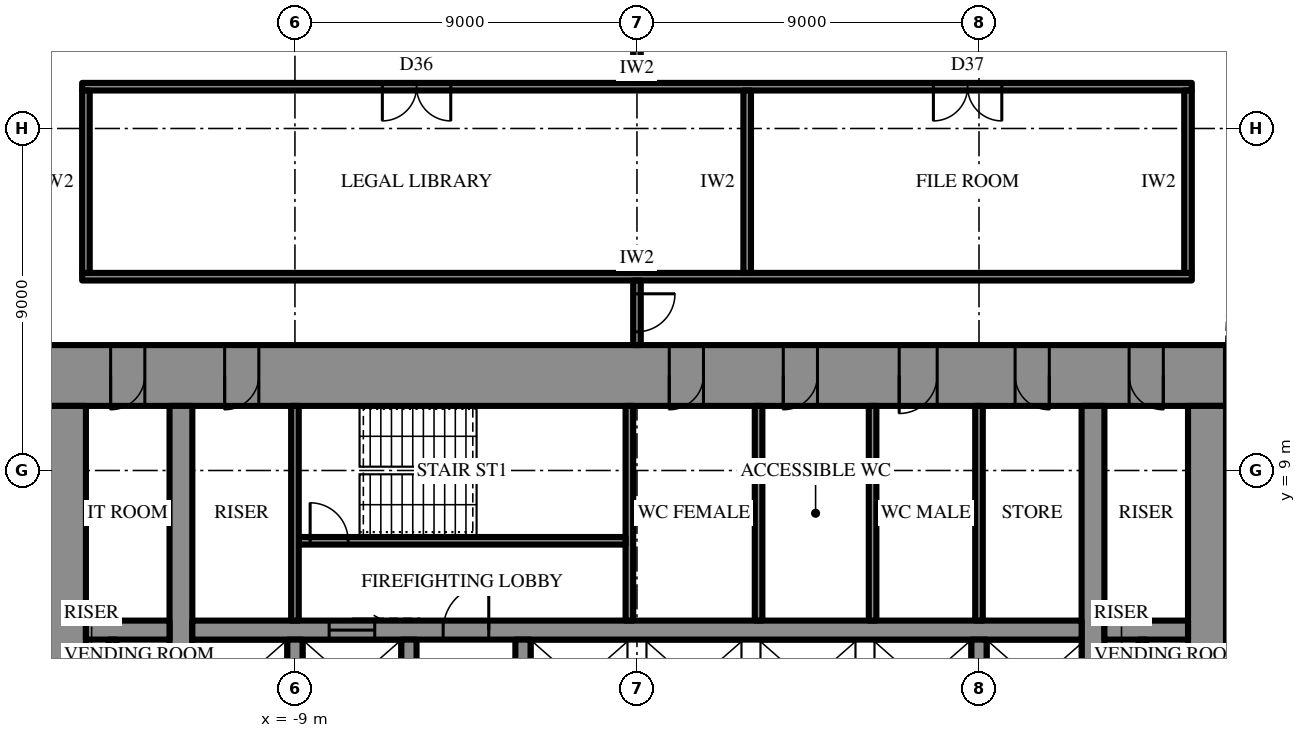
"""IFC4 building model, lengths in metres.
Left out: names, types, materials, properties, quantities, classifications, styles, units other than length and angle.
Written with IfcOpenShell. Run it as: python <this file> out.ifc"""

import sys

from ifc_helpers import new_model, si_unit, direction, frame, frame_2d, origin, place, context, subcontext, project, spatial, rectangle, extrude, element, fill, save


model = new_model("IFC4")
c1 = context("Model", 3, precision=1e-05, world=origin(), true_north=direction((0.0, 1.0)))
c2 = subcontext(c1, "Body", "Model", "MODEL_VIEW")
j1 = project(units=[si_unit("LENGTHUNIT", "METRE"), si_unit("PLANEANGLEUNIT", "RADIAN")], contexts=[c1])
p1 = place(None, origin())
s1 = spatial("IfcSite", under=j1, at=p1, CompositionType="ELEMENT")
p2 = place(p1, origin())
s2 = spatial("IfcBuilding", under=s1, at=p2, CompositionType="ELEMENT")
p3 = place(p2, frame((0.0, 0.0, 223.9)))
s3 = spatial("IfcBuildingStorey", under=s2, at=p3, CompositionType="ELEMENT", Elevation=223.9)
p4 = place(p3, frame((-15.5, 11.5, 0.0), z_axis=(0.0, 0.0, 1.0), x_axis=(1.0, 0.0, 0.0)))
e1 = element("IfcWall", 1, at=p4, inside=s3, PredefinedType="SHEAR", context=c2, shape_type="SweptSolid", body=[
    extrude(rectangle(XDim=31.0, YDim=1.6, at=frame_2d((15.5, 0.0))), origin(), (0.0, 0.0, 1.0), 4.2),
])
p5 = place(p4, frame((16.35, 0.0, 0.0)))
e2 = element("IfcOpeningElement", 2, at=p5, cuts=e1, PredefinedType="OPENING", context=c2, shape_type="SweptSolid", body=[
    extrude(rectangle(XDim=0.9, YDim=2.2, at=frame_2d((0.45, 1.1))), frame((0.0, 0.81, 0.0), z_axis=(0.0, -1.0, 0.0), x_axis=(1.0, 0.0, 0.0)), (0.0, 0.0, 1.0), 1.62),
])
p6 = place(p4, frame((19.35, 0.0, 0.0)))
e3 = element("IfcOpeningElement", 3, at=p6, cuts=e1, PredefinedType="OPENING", context=c2, shape_type="SweptSolid", body=[
    extrude(rectangle(XDim=0.9, YDim=2.2, at=frame_2d((0.45, 1.1))), frame((0.0, 0.81, 0.0), z_axis=(0.0, -1.0, 0.0), x_axis=(1.0, 0.0, 0.0)), (0.0, 0.0, 1.0), 1.62),
])
p7 = place(p4, frame((22.4, 0.0, 0.0)))
e4 = element("IfcOpeningElement", 4, at=p7, cuts=e1, PredefinedType="OPENING", context=c2, shape_type="SweptSolid", body=[
    extrude(rectangle(XDim=1.0, YDim=2.2, at=frame_2d((0.5, 1.1))), frame((0.0, 0.81, 0.0), z_axis=(0.0, -1.0, 0.0), x_axis=(1.0, 0.0, 0.0)), (0.0, 0.0, 1.0), 1.62),
])
p8 = place(p4, frame((1.65, 0.0, 0.0)))
e5 = element("IfcOpeningElement", 5, at=p8, cuts=e1, PredefinedType="OPENING", context=c2, shape_type="SweptSolid", body=[
    extrude(rectangle(XDim=0.9, YDim=2.2, at=frame_2d((0.45, 1.1))), frame((0.0, 0.81, 0.0), z_axis=(0.0, -1.0, 0.0), x_axis=(1.0, 0.0, 0.0)), (0.0, 0.0, 1.0), 1.62),
])
p9 = place(p4, frame((4.65, 0.0, 0.0)))
e6 = element("IfcOpeningElement", 6, at=p9, cuts=e1, PredefinedType="OPENING", context=c2, shape_type="SweptSolid", body=[
    extrude(rectangle(XDim=0.9, YDim=2.2, at=frame_2d((0.45, 1.1))), frame((0.0, 0.81, 0.0), z_axis=(0.0, -1.0, 0.0), x_axis=(1.0, 0.0, 0.0)), (0.0, 0.0, 1.0), 1.62),
])
p10 = place(p4, frame((25.45, 0.0, 0.0)))
e7 = element("IfcOpeningElement", 7, at=p10, cuts=e1, PredefinedType="OPENING", context=c2, shape_type="SweptSolid", body=[
    extrude(rectangle(XDim=0.9, YDim=2.2, at=frame_2d((0.45, 1.1))), frame((0.0, 0.81, 0.0), z_axis=(0.0, -1.0, 0.0), x_axis=(1.0, 0.0, 0.0)), (0.0, 0.0, 1.0), 1.62),
])
p11 = place(p4, frame((28.45, 0.0, 0.0)))
e8 = element("IfcOpeningElement", 8, at=p11, cuts=e1, PredefinedType="OPENING", context=c2, shape_type="SweptSolid", body=[
    extrude(rectangle(XDim=0.9, YDim=2.2, at=frame_2d((0.45, 1.1))), frame((0.0, 0.81, 0.0), z_axis=(0.0, -1.0, 0.0), x_axis=(1.0, 0.0, 0.0)), (0.0, 0.0, 1.0), 1.62),
])
p12 = place(p3, frame((15.0, -10.7, 0.0), z_axis=(0.0, 0.0, 1.0), x_axis=(0.0, 1.0, 0.0)))
e9 = element("IfcWall", 9, at=p12, inside=s3, PredefinedType="SHEAR", context=c2, shape_type="SweptSolid", body=[
    extrude(rectangle(XDim=21.4, YDim=1.0, at=frame_2d((10.7, 0.0))), origin(), (0.0, 0.0, 1.0), 4.2),
])
p13 = place(p12, frame((9.8, 0.0, 0.0)))
e10 = element("IfcOpeningElement", 10, at=p13, cuts=e9, PredefinedType="OPENING", context=c2, shape_type="SweptSolid", body=[
    extrude(rectangle(XDim=1.8, YDim=2.4, at=frame_2d((0.9, 1.2))), frame((0.0, 0.51, 0.0), z_axis=(0.0, -1.0, 0.0), x_axis=(1.0, 0.0, 0.0)), (0.0, 0.0, 1.0), 1.02),
])
p14 = place(p3, frame((-15.0, 10.7, 0.0), z_axis=(0.0, 0.0, 1.0), x_axis=(0.0, -1.0, 0.0)))
e11 = element("IfcWall", 11, at=p14, inside=s3, PredefinedType="SHEAR", context=c2, shape_type="SweptSolid", body=[
    extrude(rectangle(XDim=21.4, YDim=1.0, at=frame_2d((10.7, 0.0))), origin(), (0.0, 0.0, 1.0), 4.2),
])
p15 = place(p14, frame((9.8, 0.0, 0.0)))
e12 = element("IfcOpeningElement", 12, at=p15, cuts=e11, PredefinedType="OPENING", context=c2, shape_type="SweptSolid", body=[
    extrude(rectangle(XDim=1.8, YDim=2.4, at=frame_2d((0.9, 1.2))), frame((0.0, 0.51, 0.0), z_axis=(0.0, -1.0, 0.0), x_axis=(1.0, 0.0, 0.0)), (0.0, 0.0, 1.0), 1.02),
])
p16 = place(p3, frame((12.0, -10.7, 0.0), z_axis=(0.0, 0.0, 1.0), x_axis=(0.0, 1.0, 0.0)))
e13 = element("IfcWall", 13, at=p16, inside=s3, PredefinedType="SHEAR", context=c2, shape_type="SweptSolid", body=[
    extrude(rectangle(XDim=21.4, YDim=0.6, at=frame_2d((10.7, 0.0))), origin(), (0.0, 0.0, 1.0), 4.2),
])
p17 = place(p16, frame((9.8, 0.0, 0.0)))
e14 = element("IfcOpeningElement", 14, at=p17, cuts=e13, PredefinedType="OPENING", context=c2, shape_type="SweptSolid", body=[
    extrude(rectangle(XDim=1.8, YDim=2.4, at=frame_2d((0.9, 1.2))), frame((0.0, 0.31, 0.0), z_axis=(0.0, -1.0, 0.0), x_axis=(1.0, 0.0, 0.0)), (0.0, 0.0, 1.0), 0.62),
])
p18 = place(p3, frame((-12.0, -10.7, 0.0), z_axis=(0.0, 0.0, 1.0), x_axis=(0.0, 1.0, 0.0)))
e15 = element("IfcWall", 15, at=p18, inside=s3, PredefinedType="SHEAR", context=c2, shape_type="SweptSolid", body=[
    extrude(rectangle(XDim=21.4, YDim=0.6, at=frame_2d((10.7, 0.0))), origin(), (0.0, 0.0, 1.0), 4.2),
])
p19 = place(p18, frame((9.8, 0.0, 0.0)))
e16 = element("IfcOpeningElement", 16, at=p19, cuts=e15, PredefinedType="OPENING", context=c2, shape_type="SweptSolid", body=[
    extrude(rectangle(XDim=1.8, YDim=2.4, at=frame_2d((0.9, 1.2))), frame((0.0, 0.31, 0.0), z_axis=(0.0, -1.0, 0.0), x_axis=(1.0, 0.0, 0.0)), (0.0, 0.0, 1.0), 0.62),
])
p20 = place(p3, frame((-14.5, 4.8, 0.0), z_axis=(0.0, 0.0, 1.0), x_axis=(1.0, 0.0, 0.0)))
e17 = element("IfcWall", 17, at=p20, inside=s3, PredefinedType="SHEAR", context=c2, shape_type="SweptSolid", body=[
    extrude(rectangle(XDim=2.2, YDim=0.5, at=frame_2d((1.1, 0.0))), origin(), (0.0, 0.0, 1.0), 4.2),
])
p21 = place(p3, frame((-11.7, 4.8, 0.0), z_axis=(0.0, 0.0, 1.0), x_axis=(1.0, 0.0, 0.0)))
e18 = element("IfcWall", 18, at=p21, inside=s3, PredefinedType="SHEAR", context=c2, shape_type="SweptSolid", body=[
    extrude(rectangle(XDim=23.4, YDim=0.5, at=frame_2d((11.7, 0.0))), origin(), (0.0, 0.0, 1.0), 4.2),
])
p22 = place(p21, frame((6.6, 0.0, 0.0)))
e19 = element("IfcOpeningElement", 19, at=p22, cuts=e18, PredefinedType="OPENING", context=c2, shape_type="SweptSolid", body=[
    extrude(rectangle(XDim=1.2, YDim=2.2, at=frame_2d((0.6, 1.1))), frame((0.0, 0.26, 0.0), z_axis=(0.0, -1.0, 0.0), x_axis=(1.0, 0.0, 0.0)), (0.0, 0.0, 1.0), 0.52),
])
p23 = place(p21, frame((3.6, 0.0, 0.0)))
e20 = element("IfcOpeningElement", 20, at=p23, cuts=e18, PredefinedType="OPENING", context=c2, shape_type="SweptSolid", body=[
    extrude(rectangle(XDim=1.2, YDim=2.2, at=frame_2d((0.6, 1.1))), frame((0.0, 0.26, 0.0), z_axis=(0.0, -1.0, 0.0), x_axis=(1.0, 0.0, 0.0)), (0.0, 0.0, 1.0), 0.52),
])
p24 = place(p3, frame((12.3, 4.8, 0.0), z_axis=(0.0, 0.0, 1.0), x_axis=(1.0, 0.0, 0.0)))
e21 = element("IfcWall", 21, at=p24, inside=s3, PredefinedType="SHEAR", context=c2, shape_type="SweptSolid", body=[
    extrude(rectangle(XDim=2.2, YDim=0.5, at=frame_2d((1.1, 0.0))), origin(), (0.0, 0.0, 1.0), 4.2),
])
for number, where, z_axis, x_axis in (
    (22, (-9.0, 2.25, 0.0), (0.0, 0.0, 1.0), (0.0, 1.0, 0.0)),
    (23, (-6.0, 2.25, 0.0), (0.0, 0.0, 1.0), (0.0, 1.0, 0.0)),
    (24, (-3.0, 2.25, 0.0), (0.0, 0.0, 1.0), (0.0, 1.0, 0.0)),
    (25, (9.0, 2.25, 0.0), (0.0, 0.0, 1.0), (0.0, 1.0, 0.0)),
):
    element("IfcWall", number, at=place(p3, frame(where, z_axis=z_axis, x_axis=x_axis)), inside=s3, PredefinedType="SHEAR", context=c2, shape_type="SweptSolid", body=[
        extrude(rectangle(XDim=2.3, YDim=0.4, at=frame_2d((1.15, 0.0))), origin(), (0.0, 0.0, 1.0), 4.2),
    ])
p25 = place(p3, frame((-0.2, 5.05, 0.0), z_axis=(0.0, 0.0, 1.0), x_axis=(0.0, 1.0, 0.0)))
e26 = element("IfcWall", 26, at=p25, inside=s3, PredefinedType="SHEAR", context=c2, shape_type="SweptSolid", body=[
    extrude(rectangle(XDim=5.65, YDim=0.2, at=frame_2d((2.825, 0.0))), origin(), (0.0, 0.0, 1.0), 4.2),
])
p26 = place(p3, frame((-8.9, 7.15, 0.0), z_axis=(0.0, 0.0, 1.0), x_axis=(1.0, 0.0, 0.0)))
e27 = element("IfcWall", 27, at=p26, inside=s3, PredefinedType="SHEAR", context=c2, shape_type="SweptSolid", body=[
    extrude(rectangle(XDim=8.6, YDim=0.2, at=frame_2d((4.3, 0.0))), origin(), (0.0, 0.0, 1.0), 4.2),
])
p27 = place(p26, frame((0.3, 0.0, 0.0)))
e28 = element("IfcOpeningElement", 28, at=p27, cuts=e27, PredefinedType="OPENING", context=c2, shape_type="SweptSolid", body=[
    extrude(rectangle(XDim=1.0, YDim=2.2, at=frame_2d((0.5, 1.1))), frame((0.0, 0.11, 0.0), z_axis=(0.0, -1.0, 0.0), x_axis=(1.0, 0.0, 0.0)), (0.0, 0.0, 1.0), 0.22),
])
for number, where, z_axis, x_axis in (
    (29, (-9.0, 5.05, 0.0), (0.0, 0.0, 1.0), (0.0, 1.0, 0.0)),
    (30, (9.0, 5.05, 0.0), (0.0, 0.0, 1.0), (0.0, 1.0, 0.0)),
    (31, (3.2, 5.05, 0.0), (0.0, 0.0, 1.0), (0.0, 1.0, 0.0)),
    (32, (6.2, 5.05, 0.0), (0.0, 0.0, 1.0), (0.0, 1.0, 0.0)),
):
    element("IfcWall", number, at=place(p3, frame(where, z_axis=z_axis, x_axis=x_axis)), inside=s3, PredefinedType="PARTITIONING", context=c2, shape_type="SweptSolid", body=[
        extrude(rectangle(XDim=5.65, YDim=0.2, at=frame_2d((2.825, 0.0))), origin(), (0.0, 0.0, 1.0), 4.0),
    ])
for number, where, z_axis, x_axis in (
    (33, (-13.8, 3.55, 0.0), (0.0, 0.0, 1.0), (0.0, 1.0, 0.0)),
    (34, (13.3, 3.55, 0.0), (0.0, 0.0, 1.0), (0.0, 1.0, 0.0)),
):
    element("IfcWall", number, at=place(p3, frame(where, z_axis=z_axis, x_axis=x_axis)), inside=s3, PredefinedType="PARTITIONING", context=c2, shape_type="SweptSolid", body=[
        extrude(rectangle(XDim=1.0, YDim=0.2, at=frame_2d((0.5, 0.0))), origin(), (0.0, 0.0, 1.0), 4.0),
    ])
p28 = place(p3, frame((-14.6, 14.1, 0.0), z_axis=(0.0, 0.0, 1.0), x_axis=(1.0, 0.0, 0.0)))
e35 = element("IfcWall", 35, at=p28, inside=s3, PredefinedType="PARTITIONING", context=c2, shape_type="SweptSolid", body=[
    extrude(rectangle(XDim=29.2, YDim=0.2, at=frame_2d((14.6, 0.0))), origin(), (0.0, 0.0, 1.0), 4.0),
])
p29 = place(p3, frame((-14.6, 19.1, 0.0), z_axis=(0.0, 0.0, 1.0), x_axis=(1.0, 0.0, 0.0)))
e36 = element("IfcWall", 36, at=p29, inside=s3, PredefinedType="PARTITIONING", context=c2, shape_type="SweptSolid", body=[
    extrude(rectangle(XDim=29.2, YDim=0.2, at=frame_2d((14.6, 0.0))), origin(), (0.0, 0.0, 1.0), 4.0),
])
p30 = place(p29, frame((7.9, 0.0, 0.0)))
e37 = element("IfcOpeningElement", 37, at=p30, cuts=e36, PredefinedType="OPENING", context=c2, shape_type="SweptSolid", body=[
    extrude(rectangle(XDim=1.8, YDim=2.4, at=frame_2d((0.9, 1.2))), frame((0.0, 0.11, 0.0), z_axis=(0.0, -1.0, 0.0), x_axis=(1.0, 0.0, 0.0)), (0.0, 0.0, 1.0), 0.22),
])
p31 = place(p29, frame((22.4, 0.0, 0.0)))
e38 = element("IfcOpeningElement", 38, at=p31, cuts=e36, PredefinedType="OPENING", context=c2, shape_type="SweptSolid", body=[
    extrude(rectangle(XDim=1.8, YDim=2.4, at=frame_2d((0.9, 1.2))), frame((0.0, 0.11, 0.0), z_axis=(0.0, -1.0, 0.0), x_axis=(1.0, 0.0, 0.0)), (0.0, 0.0, 1.0), 0.22),
])
for number, where, z_axis, x_axis in (
    (39, (-14.5, 14.2, 0.0), (0.0, 0.0, 1.0), (0.0, 1.0, 0.0)),
    (40, (2.9, 14.2, 0.0), (0.0, 0.0, 1.0), (0.0, 1.0, 0.0)),
    (41, (14.5, 14.2, 0.0), (0.0, 0.0, 1.0), (0.0, 1.0, 0.0)),
):
    element("IfcWall", number, at=place(p3, frame(where, z_axis=z_axis, x_axis=x_axis)), inside=s3, PredefinedType="PARTITIONING", context=c2, shape_type="SweptSolid", body=[
        extrude(rectangle(XDim=4.8, YDim=0.2, at=frame_2d((2.4, 0.0))), origin(), (0.0, 0.0, 1.0), 4.0),
    ])
p32 = place(p3, frame((0.0, 12.3, 0.0), z_axis=(0.0, 0.0, 1.0), x_axis=(0.0, 1.0, 0.0)))
e42 = element("IfcWall", 42, at=p32, inside=s3, PredefinedType="PARTITIONING", context=c2, shape_type="SweptSolid", body=[
    extrude(rectangle(XDim=1.7, YDim=0.2, at=frame_2d((0.85, 0.0))), origin(), (0.0, 0.0, 1.0), 2.992),
])
p33 = place(p32, frame((0.35, 0.0, 0.0)))
e43 = element("IfcOpeningElement", 43, at=p33, cuts=e42, PredefinedType="OPENING", context=c2, shape_type="SweptSolid", body=[
    extrude(rectangle(XDim=1.0, YDim=2.2, at=frame_2d((0.5, 1.1))), frame((0.0, 0.11, 0.0), z_axis=(0.0, -1.0, 0.0), x_axis=(1.0, 0.0, 0.0)), (0.0, 0.0, 1.0), 0.22),
])
p34 = place(p3, frame((0.0, 19.2, 0.0), z_axis=(0.0, 0.0, 1.0), x_axis=(0.0, 1.0, 0.0)))
e44 = element("IfcWall", 44, at=p34, inside=s3, PredefinedType="PARTITIONING", context=c2, shape_type="SweptSolid", body=[
    extrude(rectangle(XDim=5.2, YDim=0.2, at=frame_2d((2.6, 0.0))), origin(), (0.0, 0.0, 1.0), 2.992),
])
p35 = place(p22, origin())
e45 = element("IfcDoor", 45, at=p35, inside=s3, OperationType="SINGLE_SWING_LEFT", PredefinedType="DOOR", context=c2, shape_type="SweptSolid", body=[
    extrude(rectangle(XDim=1.2, YDim=2.2, at=frame_2d((0.6, 1.1))), frame((0.0, 0.025, 0.0), z_axis=(0.0, -1.0, 0.0), x_axis=(1.0, 0.0, 0.0)), (0.0, 0.0, 1.0), 0.05),
])
fill(e19, e45)
p36 = place(p27, origin())
e46 = element("IfcDoor", 46, at=p36, inside=s3, OperationType="SINGLE_SWING_RIGHT", PredefinedType="DOOR", context=c2, shape_type="SweptSolid", body=[
    extrude(rectangle(XDim=1.0, YDim=2.2, at=frame_2d((0.5, 1.1))), frame((0.0, 0.025, 0.0), z_axis=(0.0, -1.0, 0.0), x_axis=(1.0, 0.0, 0.0)), (0.0, 0.0, 1.0), 0.05),
])
fill(e28, e46)
p37 = place(p5, frame((0.9, 0.0, 0.0), z_axis=(0.0, 0.0, 1.0), x_axis=(-1.0, 0.0, 0.0)))
e47 = element("IfcDoor", 47, at=p37, inside=s3, OperationType="SINGLE_SWING_LEFT", PredefinedType="DOOR", context=c2, shape_type="SweptSolid", body=[
    extrude(rectangle(XDim=0.9, YDim=2.2, at=frame_2d((0.45, 1.1))), frame((0.0, 0.025, 0.0), z_axis=(0.0, -1.0, 0.0), x_axis=(1.0, 0.0, 0.0)), (0.0, 0.0, 1.0), 0.05),
])
fill(e2, e47)
p38 = place(p6, frame((0.9, 0.0, 0.0), z_axis=(0.0, 0.0, 1.0), x_axis=(-1.0, 0.0, 0.0)))
e48 = element("IfcDoor", 48, at=p38, inside=s3, OperationType="SINGLE_SWING_LEFT", PredefinedType="DOOR", context=c2, shape_type="SweptSolid", body=[
    extrude(rectangle(XDim=0.9, YDim=2.2, at=frame_2d((0.45, 1.1))), frame((0.0, 0.025, 0.0), z_axis=(0.0, -1.0, 0.0), x_axis=(1.0, 0.0, 0.0)), (0.0, 0.0, 1.0), 0.05),
])
fill(e3, e48)
p39 = place(p7, frame((1.0, 0.0, 0.0), z_axis=(0.0, 0.0, 1.0), x_axis=(-1.0, 0.0, 0.0)))
e49 = element("IfcDoor", 49, at=p39, inside=s3, OperationType="SINGLE_SWING_LEFT", PredefinedType="DOOR", context=c2, shape_type="SweptSolid", body=[
    extrude(rectangle(XDim=1.0, YDim=2.2, at=frame_2d((0.5, 1.1))), frame((0.0, 0.025, 0.0), z_axis=(0.0, -1.0, 0.0), x_axis=(1.0, 0.0, 0.0)), (0.0, 0.0, 1.0), 0.05),
])
fill(e4, e49)
p40 = place(p8, frame((0.9, 0.0, 0.0), z_axis=(0.0, 0.0, 1.0), x_axis=(-1.0, 0.0, 0.0)))
e50 = element("IfcDoor", 50, at=p40, inside=s3, OperationType="SINGLE_SWING_LEFT", PredefinedType="DOOR", context=c2, shape_type="SweptSolid", body=[
    extrude(rectangle(XDim=0.9, YDim=2.2, at=frame_2d((0.45, 1.1))), frame((0.0, 0.025, 0.0), z_axis=(0.0, -1.0, 0.0), x_axis=(1.0, 0.0, 0.0)), (0.0, 0.0, 1.0), 0.05),
])
fill(e5, e50)
p41 = place(p9, frame((0.9, 0.0, 0.0), z_axis=(0.0, 0.0, 1.0), x_axis=(-1.0, 0.0, 0.0)))
e51 = element("IfcDoor", 51, at=p41, inside=s3, OperationType="SINGLE_SWING_LEFT", PredefinedType="DOOR", context=c2, shape_type="SweptSolid", body=[
    extrude(rectangle(XDim=0.9, YDim=2.2, at=frame_2d((0.45, 1.1))), frame((0.0, 0.025, 0.0), z_axis=(0.0, -1.0, 0.0), x_axis=(1.0, 0.0, 0.0)), (0.0, 0.0, 1.0), 0.05),
])
fill(e6, e51)
p42 = place(p10, frame((0.9, 0.0, 0.0), z_axis=(0.0, 0.0, 1.0), x_axis=(-1.0, 0.0, 0.0)))
e52 = element("IfcDoor", 52, at=p42, inside=s3, OperationType="SINGLE_SWING_RIGHT", PredefinedType="DOOR", context=c2, shape_type="SweptSolid", body=[
    extrude(rectangle(XDim=0.9, YDim=2.2, at=frame_2d((0.45, 1.1))), frame((0.0, 0.025, 0.0), z_axis=(0.0, -1.0, 0.0), x_axis=(1.0, 0.0, 0.0)), (0.0, 0.0, 1.0), 0.05),
])
fill(e7, e52)
p43 = place(p11, frame((0.9, 0.0, 0.0), z_axis=(0.0, 0.0, 1.0), x_axis=(-1.0, 0.0, 0.0)))
e53 = element("IfcDoor", 53, at=p43, inside=s3, OperationType="SINGLE_SWING_RIGHT", PredefinedType="DOOR", context=c2, shape_type="SweptSolid", body=[
    extrude(rectangle(XDim=0.9, YDim=2.2, at=frame_2d((0.45, 1.1))), frame((0.0, 0.025, 0.0), z_axis=(0.0, -1.0, 0.0), x_axis=(1.0, 0.0, 0.0)), (0.0, 0.0, 1.0), 0.05),
])
fill(e8, e53)
p44 = place(p23, origin())
e54 = element("IfcDoor", 54, at=p44, inside=s3, OperationType="SLIDING_TO_LEFT", PredefinedType="DOOR", context=c2, shape_type="SweptSolid", body=[
    extrude(rectangle(XDim=1.2, YDim=2.2, at=frame_2d((0.6, 1.1))), frame((0.0, 0.025, 0.0), z_axis=(0.0, -1.0, 0.0), x_axis=(1.0, 0.0, 0.0)), (0.0, 0.0, 1.0), 0.05),
])
fill(e20, e54)
p45 = place(p30, frame((1.8, 0.0, 0.0), z_axis=(0.0, 0.0, 1.0), x_axis=(-1.0, 0.0, 0.0)))
e55 = element("IfcDoor", 55, at=p45, inside=s3, OperationType="DOUBLE_DOOR_SINGLE_SWING", PredefinedType="DOOR", context=c2, shape_type="SweptSolid", body=[
    extrude(rectangle(XDim=1.8, YDim=2.4, at=frame_2d((0.9, 1.2))), frame((0.0, 0.025, 0.0), z_axis=(0.0, -1.0, 0.0), x_axis=(1.0, 0.0, 0.0)), (0.0, 0.0, 1.0), 0.05),
])
fill(e37, e55)
p46 = place(p31, frame((1.8, 0.0, 0.0), z_axis=(0.0, 0.0, 1.0), x_axis=(-1.0, 0.0, 0.0)))
e56 = element("IfcDoor", 56, at=p46, inside=s3, OperationType="DOUBLE_DOOR_SINGLE_SWING", PredefinedType="DOOR", context=c2, shape_type="SweptSolid", body=[
    extrude(rectangle(XDim=1.8, YDim=2.4, at=frame_2d((0.9, 1.2))), frame((0.0, 0.025, 0.0), z_axis=(0.0, -1.0, 0.0), x_axis=(1.0, 0.0, 0.0)), (0.0, 0.0, 1.0), 0.05),
])
fill(e38, e56)
p47 = place(p33, frame((1.0, 0.0, 0.0), z_axis=(0.0, 0.0, 1.0), x_axis=(-1.0, 0.0, 0.0)))
e57 = element("IfcDoor", 57, at=p47, inside=s3, OperationType="SINGLE_SWING_RIGHT", PredefinedType="DOOR", context=c2, shape_type="SweptSolid", body=[
    extrude(rectangle(XDim=1.0, YDim=2.2, at=frame_2d((0.5, 1.1))), frame((0.0, 0.025, 0.0), z_axis=(0.0, -1.0, 0.0), x_axis=(1.0, 0.0, 0.0)), (0.0, 0.0, 1.0), 0.05),
])
fill(e43, e57)
save(model, sys.argv[1])
